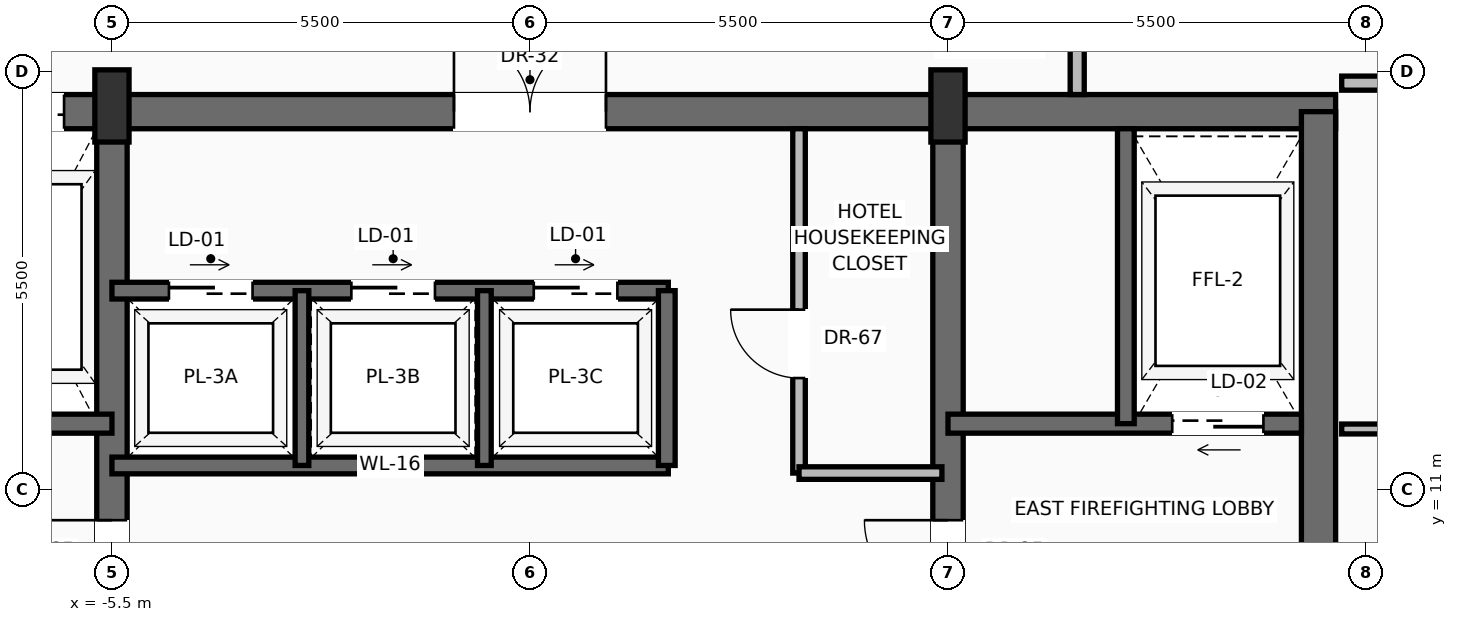
"""IFC4 building model, lengths in metres.
Left out: names, types, materials, properties, quantities, classifications, styles, units other than length and angle.
Written with IfcOpenShell. Run it as: python <this file> out.ifc"""

import sys

from ifc_helpers import new_model, si_unit, direction, frame, frame_2d, origin, origin_2d, place, context, subcontext, project, spatial, rectangle, extrude, source, transform, mapped, element, fill, save


model = new_model("IFC4")
c1 = context("Model", 3, precision=1e-05, world=origin(), true_north=direction((0.0, 1.0)))
c2 = subcontext(c1, "Body", "Model", "MODEL_VIEW")
j1 = project(units=[si_unit("LENGTHUNIT", "METRE"), si_unit("PLANEANGLEUNIT", "RADIAN")], contexts=[c1])
p1 = place(None, origin())
s1 = spatial("IfcSite", under=j1, at=p1, CompositionType="ELEMENT")
p2 = place(p1, origin())
s2 = spatial("IfcBuilding", under=s1, at=p2, CompositionType="ELEMENT")
p3 = place(p2, frame((0.0, 0.0, 290.25)))
s3 = spatial("IfcBuildingStorey", under=s2, at=p3, CompositionType="ELEMENT", Elevation=290.25)
p4 = place(p3, frame((-10.6, 15.975, 0.0), z_axis=(0.0, 0.0, 1.0), x_axis=(1.0, 0.0, 0.0)))
e1 = element("IfcWall", 1, at=p4, inside=s3, PredefinedType="SHEAR", context=c2, shape_type="SweptSolid", body=[
    extrude(rectangle(XDim=21.2, YDim=0.45, at=frame_2d((10.6, 0.0))), origin(), (0.0, 0.0, 1.0), 3.24),
])
p5 = place(p4, frame((3.17, 0.0, 0.0)))
e2 = element("IfcOpeningElement", 2, at=p5, cuts=e1, PredefinedType="OPENING", context=c2, shape_type="SweptSolid", body=[
    extrude(rectangle(XDim=1.3, YDim=2.3, at=frame_2d((0.65, 1.15))), frame((0.0, 0.235, 0.0), z_axis=(0.0, -1.0, 0.0), x_axis=(1.0, 0.0, 0.0)), (0.0, 0.0, 1.0), 0.47),
])
p6 = place(p4, frame((9.6, 0.0, 0.0)))
e3 = element("IfcOpeningElement", 3, at=p6, cuts=e1, PredefinedType="OPENING", context=c2, shape_type="SweptSolid", body=[
    extrude(rectangle(XDim=2.0, YDim=2.4, at=frame_2d((1.0, 1.2))), frame((0.0, 0.235, 0.0), z_axis=(0.0, -1.0, 0.0), x_axis=(1.0, 0.0, 0.0)), (0.0, 0.0, 1.0), 0.47),
])
p7 = place(p3, frame((10.375, 0.625, 0.0), z_axis=(0.0, 0.0, 1.0), x_axis=(0.0, 1.0, 0.0)))
e4 = element("IfcWall", 4, at=p7, inside=s3, PredefinedType="SHEAR", context=c2, shape_type="SweptSolid", body=[
    extrude(rectangle(XDim=15.35, YDim=0.45, at=frame_2d((7.675, 0.0))), origin(), (0.0, 0.0, 1.0), 3.24),
])
p8 = place(p3, frame((-5.5, 0.625, 0.0), z_axis=(0.0, 0.0, 1.0), x_axis=(0.0, 1.0, 0.0)))
e5 = element("IfcWall", 5, at=p8, inside=s3, PredefinedType="SHEAR", context=c2, shape_type="SweptSolid", body=[
    extrude(rectangle(XDim=15.35, YDim=0.4, at=frame_2d((7.675, 0.0))), origin(), (0.0, 0.0, 1.0), 3.24),
])
p9 = place(p8, frame((8.875, 0.0, 0.0)))
e6 = element("IfcOpeningElement", 6, at=p9, cuts=e5, PredefinedType="OPENING", context=c2, shape_type="SweptSolid", body=[
    extrude(rectangle(XDim=1.1, YDim=2.2, at=frame_2d((0.55, 1.1))), frame((0.0, 0.21, 0.0), z_axis=(0.0, -1.0, 0.0), x_axis=(1.0, 0.0, 0.0)), (0.0, 0.0, 1.0), 0.42),
])
p10 = place(p3, frame((5.5, 0.625, 0.0), z_axis=(0.0, 0.0, 1.0), x_axis=(0.0, 1.0, 0.0)))
e7 = element("IfcWall", 7, at=p10, inside=s3, PredefinedType="SHEAR", context=c2, shape_type="SweptSolid", body=[
    extrude(rectangle(XDim=15.35, YDim=0.4, at=frame_2d((7.675, 0.0))), origin(), (0.0, 0.0, 1.0), 3.24),
])
p11 = place(p10, frame((8.875, 0.0, 0.0)))
e8 = element("IfcOpeningElement", 8, at=p11, cuts=e7, PredefinedType="OPENING", context=c2, shape_type="SweptSolid", body=[
    extrude(rectangle(XDim=1.1, YDim=2.2, at=frame_2d((0.55, 1.1))), frame((0.0, 0.21, 0.0), z_axis=(0.0, -1.0, 0.0), x_axis=(1.0, 0.0, 0.0)), (0.0, 0.0, 1.0), 0.42),
])
m1 = source(origin(), c2, "Body", "SweptSolid", [
    extrude(rectangle(XDim=0.45, YDim=0.95, at=origin_2d()), origin(), (0.0, 0.0, 1.0), 3.45),
])
for number, where, z_axis, x_axis in (
    (9, (-5.5, 16.05, 0.0), (0.0, 0.0, 1.0), (1.0, 0.0, 0.0)),
    (10, (5.5, 16.05, 0.0), (0.0, 0.0, 1.0), (1.0, 0.0, 0.0)),
):
    element("IfcColumn", number, at=place(p3, frame(where, z_axis=z_axis, x_axis=x_axis)), inside=s3, PredefinedType="PILASTER", context=c2, shape_type="MappedRepresentation", body=[
        mapped(m1, transform((0.0, 0.0, 0.0), scale=1.0)),
    ])
p12 = place(p3, frame((7.667, 31.624, 0.0), z_axis=(0.0, 0.0, 1.0), x_axis=(0.5024293772, -0.864618251558, 0.0)))
e11 = element("IfcWall", 11, at=p12, inside=s3, PredefinedType="SOLIDWALL", context=c2, shape_type="SweptSolid", body=[
    extrude(rectangle(XDim=20.121, YDim=0.28, at=frame_2d((10.061, 0.0))), origin(), (0.0, 0.0, 1.0), 2.82),
])
p13 = place(p12, frame((4.829, 0.0, 0.0)))
e12 = element("IfcOpeningElement", 12, at=p13, cuts=e11, PredefinedType="OPENING", context=c2, shape_type="SweptSolid", body=[
    extrude(rectangle(XDim=1.6, YDim=2.35, at=frame_2d((0.8, 1.175))), frame((0.0, 0.15, 0.0), z_axis=(0.0, -1.0, 0.0), x_axis=(1.0, 0.0, 0.0)), (0.0, 0.0, 1.0), 0.3),
])
p14 = place(p12, frame((13.682, 0.0, 0.9)))
e13 = element("IfcOpeningElement", 13, at=p14, cuts=e11, PredefinedType="OPENING", context=c2, shape_type="SweptSolid", body=[
    extrude(rectangle(XDim=2.0, YDim=1.75, at=frame_2d((1.0, 0.875))), frame((0.0, 0.15, 0.0), z_axis=(0.0, -1.0, 0.0), x_axis=(1.0, 0.0, 0.0)), (0.0, 0.0, 1.0), 0.3),
])
p15 = place(p3, frame((-5.5, 11.87, 0.0), z_axis=(0.0, 0.0, 1.0), x_axis=(-1.0, 0.0, 0.0)))
e14 = element("IfcWall", 14, at=p15, inside=s3, PredefinedType="SOLIDWALL", context=c2, shape_type="SweptSolid", body=[
    extrude(rectangle(XDim=4.65, YDim=0.25, at=frame_2d((2.325, 0.0))), origin(), (0.0, 0.0, 1.0), 3.24),
])
p16 = place(p15, frame((2.95, 0.0, 0.0)))
e15 = element("IfcOpeningElement", 15, at=p16, cuts=e14, PredefinedType="OPENING", context=c2, shape_type="SweptSolid", body=[
    extrude(rectangle(XDim=1.2, YDim=2.25, at=frame_2d((0.6, 1.125))), frame((0.0, 0.135, 0.0), z_axis=(0.0, -1.0, 0.0), x_axis=(1.0, 0.0, 0.0)), (0.0, 0.0, 1.0), 0.27),
])
p17 = place(p3, frame((10.15, 11.87, 0.0), z_axis=(0.0, 0.0, 1.0), x_axis=(-1.0, 0.0, 0.0)))
e16 = element("IfcWall", 16, at=p17, inside=s3, PredefinedType="SOLIDWALL", context=c2, shape_type="SweptSolid", body=[
    extrude(rectangle(XDim=4.65, YDim=0.25, at=frame_2d((2.325, 0.0))), origin(), (0.0, 0.0, 1.0), 3.24),
])
p18 = place(p17, frame((0.5, 0.0, 0.0)))
e17 = element("IfcOpeningElement", 17, at=p18, cuts=e16, PredefinedType="OPENING", context=c2, shape_type="SweptSolid", body=[
    extrude(rectangle(XDim=1.2, YDim=2.25, at=frame_2d((0.6, 1.125))), frame((0.0, 0.135, 0.0), z_axis=(0.0, -1.0, 0.0), x_axis=(1.0, 0.0, 0.0)), (0.0, 0.0, 1.0), 0.27),
])
p19 = place(p3, frame((7.84, 11.87, 0.0), z_axis=(0.0, 0.0, 1.0), x_axis=(0.0, 1.0, 0.0)))
e18 = element("IfcWall", 18, at=p19, inside=s3, PredefinedType="SOLIDWALL", context=c2, shape_type="SweptSolid", body=[
    extrude(rectangle(XDim=3.88, YDim=0.22, at=frame_2d((1.94, 0.0))), origin(), (0.0, 0.0, 1.0), 3.24),
])
p20 = place(p3, frame((-5.5, 11.32, 0.0), z_axis=(0.0, 0.0, 1.0), x_axis=(1.0, 0.0, 0.0)))
e19 = element("IfcWall", 19, at=p20, inside=s3, PredefinedType="SOLIDWALL", context=c2, shape_type="SweptSolid", body=[
    extrude(rectangle(XDim=7.32, YDim=0.22, at=frame_2d((3.66, 0.0))), origin(), (0.0, 0.0, 1.0), 3.24),
])
p21 = place(p3, frame((-5.5, 13.62, 0.0), z_axis=(0.0, 0.0, 1.0), x_axis=(1.0, 0.0, 0.0)))
e20 = element("IfcWall", 20, at=p21, inside=s3, PredefinedType="SOLIDWALL", context=c2, shape_type="SweptSolid", body=[
    extrude(rectangle(XDim=7.32, YDim=0.22, at=frame_2d((3.66, 0.0))), origin(), (0.0, 0.0, 1.0), 3.24),
])
p22 = place(p21, frame((0.75, 0.0, 0.0)))
e21 = element("IfcOpeningElement", 21, at=p22, cuts=e20, PredefinedType="OPENING", context=c2, shape_type="SweptSolid", body=[
    extrude(rectangle(XDim=1.1, YDim=2.2, at=frame_2d((0.55, 1.1))), frame((0.0, 0.12, 0.0), z_axis=(0.0, -1.0, 0.0), x_axis=(1.0, 0.0, 0.0)), (0.0, 0.0, 1.0), 0.24),
])
p23 = place(p21, frame((3.15, 0.0, 0.0)))
e22 = element("IfcOpeningElement", 22, at=p23, cuts=e20, PredefinedType="OPENING", context=c2, shape_type="SweptSolid", body=[
    extrude(rectangle(XDim=1.1, YDim=2.2, at=frame_2d((0.55, 1.1))), frame((0.0, 0.12, 0.0), z_axis=(0.0, -1.0, 0.0), x_axis=(1.0, 0.0, 0.0)), (0.0, 0.0, 1.0), 0.24),
])
p24 = place(p21, frame((5.55, 0.0, 0.0)))
e23 = element("IfcOpeningElement", 23, at=p24, cuts=e20, PredefinedType="OPENING", context=c2, shape_type="SweptSolid", body=[
    extrude(rectangle(XDim=1.1, YDim=2.2, at=frame_2d((0.55, 1.1))), frame((0.0, 0.12, 0.0), z_axis=(0.0, -1.0, 0.0), x_axis=(1.0, 0.0, 0.0)), (0.0, 0.0, 1.0), 0.24),
])
p25 = place(p3, frame((1.8, 11.32, 0.0), z_axis=(0.0, 0.0, 1.0), x_axis=(0.0, 1.0, 0.0)))
e24 = element("IfcWall", 24, at=p25, inside=s3, PredefinedType="SOLIDWALL", context=c2, shape_type="SweptSolid", body=[
    extrude(rectangle(XDim=2.3, YDim=0.22, at=frame_2d((1.15, 0.0))), origin(), (0.0, 0.0, 1.0), 3.24),
])
for number, where, z_axis, x_axis in (
    (25, (-3.0, 11.32, 0.0), (0.0, 0.0, 1.0), (0.0, 1.0, 0.0)),
    (26, (-0.6, 11.32, 0.0), (0.0, 0.0, 1.0), (0.0, 1.0, 0.0)),
):
    element("IfcWall", number, at=place(p3, frame(where, z_axis=z_axis, x_axis=x_axis)), inside=s3, PredefinedType="SOLIDWALL", context=c2, shape_type="SweptSolid", body=[
        extrude(rectangle(XDim=2.3, YDim=0.18, at=frame_2d((1.15, 0.0))), origin(), (0.0, 0.0, 1.0), 3.24),
    ])
p26 = place(p3, frame((3.54, 11.22, 0.0), z_axis=(0.0, 0.0, 1.0), x_axis=(0.0, 1.0, 0.0)))
e27 = element("IfcWall", 27, at=p26, inside=s3, PredefinedType="PARTITIONING", context=c2, shape_type="SweptSolid", body=[
    extrude(rectangle(XDim=4.53, YDim=0.165, at=frame_2d((2.265, 0.0))), origin(), (0.0, 0.0, 1.0), 3.232),
])
p27 = place(p26, frame((1.25, 0.0, 0.0)))
e28 = element("IfcOpeningElement", 28, at=p27, cuts=e27, PredefinedType="OPENING", context=c2, shape_type="SweptSolid", body=[
    extrude(rectangle(XDim=0.9, YDim=2.1, at=frame_2d((0.45, 1.05))), frame((0.0, 0.093, 0.0), z_axis=(0.0, -1.0, 0.0), x_axis=(1.0, 0.0, 0.0)), (0.0, 0.0, 1.0), 0.185),
])
p28 = place(p3, frame((3.54, 11.22, 0.0), z_axis=(0.0, 0.0, 1.0), x_axis=(1.0, 0.0, 0.0)))
e29 = element("IfcWall", 29, at=p28, inside=s3, PredefinedType="PARTITIONING", context=c2, shape_type="SweptSolid", body=[
    extrude(rectangle(XDim=1.88, YDim=0.165, at=frame_2d((0.94, 0.0))), origin(), (0.0, 0.0, 1.0), 3.232),
])
p29 = place(p3, frame((7.2, 16.2, 0.0), z_axis=(0.0, 0.0, 1.0), x_axis=(0.0, 1.0, 0.0)))
e30 = element("IfcWall", 30, at=p29, inside=s3, PredefinedType="PARTITIONING", context=c2, shape_type="SweptSolid", body=[
    extrude(rectangle(XDim=10.4, YDim=0.185, at=frame_2d((5.2, 0.0))), origin(), (0.0, 0.0, 1.0), 3.232),
])
p30 = place(p29, frame((2.198, 0.0, 0.0)))
e31 = element("IfcOpeningElement", 31, at=p30, cuts=e30, PredefinedType="OPENING", context=c2, shape_type="SweptSolid", body=[
    extrude(rectangle(XDim=1.05, YDim=2.25, at=frame_2d((0.525, 1.125))), frame((0.0, 0.103, 0.0), z_axis=(0.0, -1.0, 0.0), x_axis=(1.0, 0.0, 0.0)), (0.0, 0.0, 1.0), 0.205),
])
p31 = place(p29, frame((5.252, 0.0, 0.0)))
e32 = element("IfcOpeningElement", 32, at=p31, cuts=e30, PredefinedType="OPENING", context=c2, shape_type="SweptSolid", body=[
    extrude(rectangle(XDim=1.05, YDim=2.25, at=frame_2d((0.525, 1.125))), frame((0.0, 0.103, 0.0), z_axis=(0.0, -1.0, 0.0), x_axis=(1.0, 0.0, 0.0)), (0.0, 0.0, 1.0), 0.205),
])
p32 = place(p29, frame((8.369, 0.0, 0.0)))
e33 = element("IfcOpeningElement", 33, at=p32, cuts=e30, PredefinedType="OPENING", context=c2, shape_type="SweptSolid", body=[
    extrude(rectangle(XDim=1.05, YDim=2.25, at=frame_2d((0.525, 1.125))), frame((0.0, 0.103, 0.0), z_axis=(0.0, -1.0, 0.0), x_axis=(1.0, 0.0, 0.0)), (0.0, 0.0, 1.0), 0.205),
])
p33 = place(p3, frame((10.68, 16.35, 0.0), z_axis=(0.0, 0.0, 1.0), x_axis=(1.0, 0.0, 0.0)))
e34 = element("IfcWall", 34, at=p33, inside=s3, PredefinedType="PARTITIONING", context=c2, shape_type="SweptSolid", body=[
    extrude(rectangle(XDim=6.013, YDim=0.185, at=frame_2d((3.006, 0.0))), origin(), (0.0, 0.0, 1.0), 3.232),
])
p34 = place(p33, frame((1.681, 0.0, 0.0)))
e35 = element("IfcOpeningElement", 35, at=p34, cuts=e34, PredefinedType="OPENING", context=c2, shape_type="SweptSolid", body=[
    extrude(rectangle(XDim=1.05, YDim=2.25, at=frame_2d((0.525, 1.125))), frame((0.0, 0.103, 0.0), z_axis=(0.0, -1.0, 0.0), x_axis=(1.0, 0.0, 0.0)), (0.0, 0.0, 1.0), 0.205),
])
p35 = place(p3, frame((10.68, 11.8, 0.0), z_axis=(0.0, 0.0, 1.0), x_axis=(1.0, 0.0, 0.0)))
e36 = element("IfcWall", 36, at=p35, inside=s3, PredefinedType="PARTITIONING", context=c2, shape_type="SweptSolid", body=[
    extrude(rectangle(XDim=8.657, YDim=0.13, at=frame_2d((4.329, 0.0))), origin(), (0.0, 0.0, 1.0), 3.232),
])
p36 = place(p35, frame((3.455, 0.0, 0.0)))
e37 = element("IfcOpeningElement", 37, at=p36, cuts=e36, PredefinedType="OPENING", context=c2, shape_type="SweptSolid", body=[
    extrude(rectangle(XDim=0.95, YDim=2.2, at=frame_2d((0.475, 1.1))), frame((0.0, 0.075, 0.0), z_axis=(0.0, -1.0, 0.0), x_axis=(1.0, 0.0, 0.0)), (0.0, 0.0, 1.0), 0.15),
])
m2 = source(origin(), c2, "Body", "SweptSolid", [
    extrude(rectangle(XDim=1.1, YDim=2.2, at=frame_2d((0.55, 1.1))), frame((0.0, 0.025, 0.0), z_axis=(0.0, -1.0, 0.0), x_axis=(1.0, 0.0, 0.0)), (0.0, 0.0, 1.0), 0.05),
])
p37 = place(p9, origin())
e38 = element("IfcDoor", 38, at=p37, inside=s3, OperationType="SINGLE_SWING_RIGHT", PredefinedType="DOOR", context=c2, shape_type="MappedRepresentation", body=[
    mapped(m2, transform((0.0, 0.0, 0.0), scale=1.0)),
])
fill(e6, e38)
m3 = source(origin(), c2, "Body", "SweptSolid", [
    extrude(rectangle(XDim=1.3, YDim=2.3, at=frame_2d((0.65, 1.15))), frame((0.0, 0.025, 0.0), z_axis=(0.0, -1.0, 0.0), x_axis=(1.0, 0.0, 0.0)), (0.0, 0.0, 1.0), 0.05),
])
p38 = place(p5, origin())
e39 = element("IfcDoor", 39, at=p38, inside=s3, OperationType="SLIDING_TO_RIGHT", PredefinedType="DOOR", context=c2, shape_type="MappedRepresentation", body=[
    mapped(m3, transform((0.0, 0.0, 0.0), scale=1.0)),
])
fill(e2, e39)
p39 = place(p11, origin())
e40 = element("IfcDoor", 40, at=p39, inside=s3, OperationType="SINGLE_SWING_RIGHT", PredefinedType="DOOR", context=c2, shape_type="MappedRepresentation", body=[
    mapped(m2, transform((0.0, 0.0, 0.0), scale=1.0)),
])
fill(e8, e40)
m4 = source(origin(), c2, "Body", "SweptSolid", [
    extrude(rectangle(XDim=1.2, YDim=2.25, at=frame_2d((0.6, 1.125))), frame((0.0, 0.025, 0.0), z_axis=(0.0, -1.0, 0.0), x_axis=(1.0, 0.0, 0.0)), (0.0, 0.0, 1.0), 0.05),
])
p40 = place(p18, origin())
e41 = element("IfcDoor", 41, at=p40, inside=s3, OperationType="SLIDING_TO_RIGHT", PredefinedType="DOOR", context=c2, shape_type="MappedRepresentation", body=[
    mapped(m4, transform((0.0, 0.0, 0.0), scale=1.0)),
])
fill(e17, e41)
m5 = source(origin(), c2, "Body", "SweptSolid", [
    extrude(rectangle(XDim=2.0, YDim=2.4, at=frame_2d((1.0, 1.2))), frame((0.0, 0.025, 0.0), z_axis=(0.0, -1.0, 0.0), x_axis=(1.0, 0.0, 0.0)), (0.0, 0.0, 1.0), 0.05),
])
p41 = place(p6, origin())
e42 = element("IfcDoor", 42, at=p41, inside=s3, OperationType="DOUBLE_DOOR_SINGLE_SWING", PredefinedType="DOOR", context=c2, shape_type="MappedRepresentation", body=[
    mapped(m5, transform((0.0, 0.0, 0.0), scale=1.0)),
])
fill(e3, e42)
m6 = source(origin(), c2, "Body", "SweptSolid", [
    extrude(rectangle(XDim=1.1, YDim=2.2, at=frame_2d((0.55, 1.1))), frame((0.0, 0.025, 0.0), z_axis=(0.0, -1.0, 0.0), x_axis=(1.0, 0.0, 0.0)), (0.0, 0.0, 1.0), 0.05),
])
p42 = place(p22, origin())
e43 = element("IfcDoor", 43, at=p42, inside=s3, OperationType="SLIDING_TO_RIGHT", PredefinedType="DOOR", context=c2, shape_type="MappedRepresentation", body=[
    mapped(m6, transform((0.0, 0.0, 0.0), scale=1.0)),
])
fill(e21, e43)
p43 = place(p23, origin())
e44 = element("IfcDoor", 44, at=p43, inside=s3, OperationType="SLIDING_TO_RIGHT", PredefinedType="DOOR", context=c2, shape_type="MappedRepresentation", body=[
    mapped(m6, transform((0.0, 0.0, 0.0), scale=1.0)),
])
fill(e22, e44)
p44 = place(p24, origin())
e45 = element("IfcDoor", 45, at=p44, inside=s3, OperationType="SLIDING_TO_RIGHT", PredefinedType="DOOR", context=c2, shape_type="MappedRepresentation", body=[
    mapped(m6, transform((0.0, 0.0, 0.0), scale=1.0)),
])
fill(e23, e45)
m7 = source(origin(), c2, "Body", "SweptSolid", [
    extrude(rectangle(XDim=0.9, YDim=2.1, at=frame_2d((0.45, 1.05))), frame((0.0, 0.025, 0.0), z_axis=(0.0, -1.0, 0.0), x_axis=(1.0, 0.0, 0.0)), (0.0, 0.0, 1.0), 0.05),
])
p45 = place(p27, origin())
e46 = element("IfcDoor", 46, at=p45, inside=s3, OperationType="SINGLE_SWING_RIGHT", PredefinedType="DOOR", context=c2, shape_type="MappedRepresentation", body=[
    mapped(m7, transform((0.0, 0.0, 0.0), scale=1.0)),
])
fill(e28, e46)
save(model, sys.argv[1])
